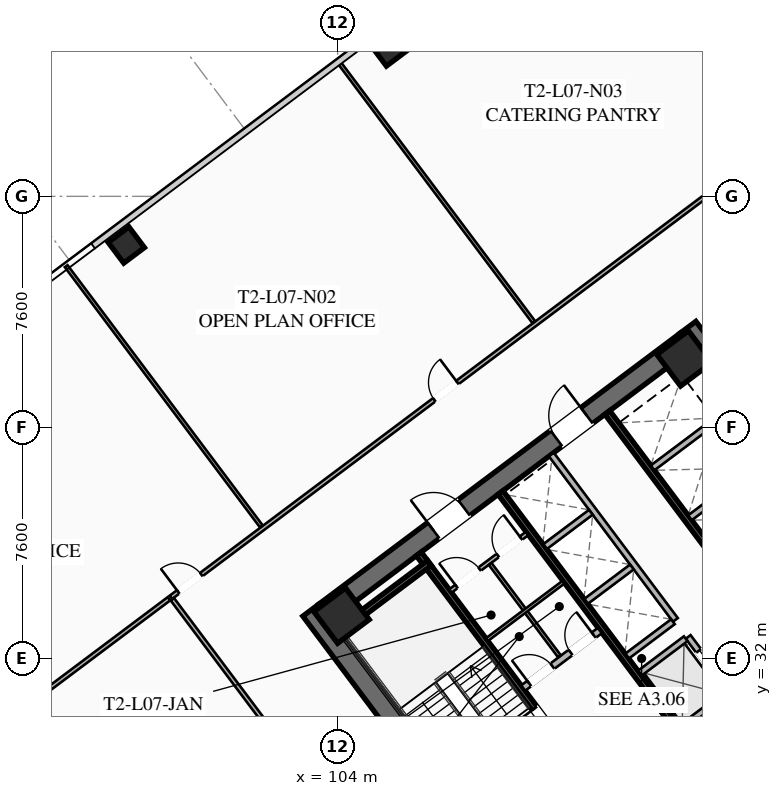
"""IFC4 building model, lengths in metres.
Left out: names, types, materials, properties, quantities, classifications, styles, units other than length and angle.
Written with IfcOpenShell. Run it as: python <this file> out.ifc"""

import sys

from ifc_helpers import new_model, si_unit, direction, frame, frame_2d, origin, origin_2d, place, context, subcontext, project, spatial, rectangle, hollow_rectangle, extrude, element, fill, save


model = new_model("IFC4")
c1 = context("Model", 3, precision=1e-05, world=origin(), true_north=direction((0.0, 1.0)))
c2 = subcontext(c1, "Body", "Model", "MODEL_VIEW")
j1 = project(units=[si_unit("LENGTHUNIT", "METRE"), si_unit("PLANEANGLEUNIT", "RADIAN")], contexts=[c1])
p1 = place(None, origin())
s1 = spatial("IfcSite", under=j1, at=p1, CompositionType="ELEMENT")
p2 = place(p1, origin())
s2 = spatial("IfcBuilding", under=s1, at=p2, CompositionType="ELEMENT")
p3 = place(p2, frame((0.0, 0.0, 31.7)))
s3 = spatial("IfcBuildingStorey", under=s2, at=p3, CompositionType="ELEMENT", Elevation=31.7)
for number, where, z_axis, x_axis in (
    (1, (112.476, 21.107, 0.0), (0.0, 0.0, 1.0), (-0.6, 0.8, 0.0)),
    (2, (115.524, 42.893, 0.0), (0.0, 0.0, 1.0), (0.6, -0.8, 0.0)),
):
    element("IfcWall", number, at=place(p3, frame(where, z_axis=z_axis, x_axis=x_axis)), inside=s3, PredefinedType="SHEAR", context=c2, shape_type="SweptSolid", body=[
        extrude(rectangle(XDim=15.6, YDim=0.65, at=frame_2d((7.8, 0.0))), origin(), (0.0, 0.0, 1.0), 3.55),
    ])
p4 = place(p3, frame((124.429, 30.478, 0.0), z_axis=(0.0, 0.0, 1.0), x_axis=(-0.799998028465, -0.600002628705, 0.0)))
e3 = element("IfcWall", 3, at=p4, inside=s3, PredefinedType="SHEAR", context=c2, shape_type="SweptSolid", body=[
    extrude(rectangle(XDim=14.86, YDim=0.65, at=frame_2d((7.43, 0.0))), origin(), (0.0, 0.0, 1.0), 3.55),
])
p5 = place(p4, frame((9.13, 0.0, 0.0)))
e4 = element("IfcOpeningElement", 4, at=p5, cuts=e3, PredefinedType="OPENING", context=c2, shape_type="SweptSolid", body=[
    extrude(rectangle(XDim=1.25, YDim=2.25, at=frame_2d((0.625, 1.125))), frame((0.0, 0.335, 0.0), z_axis=(0.0, -1.0, 0.0), x_axis=(1.0, 0.0, 0.0)), (0.0, 0.0, 1.0), 0.67),
])
p6 = place(p4, frame((4.08, 0.0, 0.0)))
e5 = element("IfcOpeningElement", 5, at=p6, cuts=e3, PredefinedType="OPENING", context=c2, shape_type="SweptSolid", body=[
    extrude(rectangle(XDim=1.25, YDim=2.25, at=frame_2d((0.625, 1.125))), frame((0.0, 0.335, 0.0), z_axis=(0.0, -1.0, 0.0), x_axis=(1.0, 0.0, 0.0)), (0.0, 0.0, 1.0), 0.67),
])
p7 = place(p3, frame((103.571, 33.522, 0.0), z_axis=(0.0, 0.0, 1.0), x_axis=(0.799998028465, 0.600002628705, 0.0)))
e6 = element("IfcWall", 6, at=p7, inside=s3, PredefinedType="SHEAR", context=c2, shape_type="SweptSolid", body=[
    extrude(rectangle(XDim=14.86, YDim=0.65, at=frame_2d((7.43, 0.0))), origin(), (0.0, 0.0, 1.0), 3.55),
])
p8 = place(p7, frame((4.48, 0.0, 0.0)))
e7 = element("IfcOpeningElement", 7, at=p8, cuts=e6, PredefinedType="OPENING", context=c2, shape_type="SweptSolid", body=[
    extrude(rectangle(XDim=1.25, YDim=2.25, at=frame_2d((0.625, 1.125))), frame((0.0, 0.335, 0.0), z_axis=(0.0, -1.0, 0.0), x_axis=(1.0, 0.0, 0.0)), (0.0, 0.0, 1.0), 0.67),
])
p9 = place(p7, frame((9.53, 0.0, 0.0)))
e8 = element("IfcOpeningElement", 8, at=p9, cuts=e6, PredefinedType="OPENING", context=c2, shape_type="SweptSolid", body=[
    extrude(rectangle(XDim=1.25, YDim=2.25, at=frame_2d((0.625, 1.125))), frame((0.0, 0.335, 0.0), z_axis=(0.0, -1.0, 0.0), x_axis=(1.0, 0.0, 0.0)), (0.0, 0.0, 1.0), 0.67),
])
for number, where, z_axis, x_axis in (
    (9, (115.41, 41.87, 0.0), (0.0, 0.0, 1.0), (0.8, 0.6, 0.0)),
    (10, (104.13, 33.41, 0.0), (0.0, 0.0, 1.0), (0.8, 0.6, 0.0)),
):
    element("IfcColumn", number, at=place(p3, frame(where, z_axis=z_axis, x_axis=x_axis)), inside=s3, PredefinedType="COLUMN", context=c2, shape_type="SweptSolid", body=[
        extrude(hollow_rectangle(XDim=1.3, YDim=1.3, WallThickness=0.05, at=origin_2d()), origin(), (0.0, 0.0, 1.0), 3.35),
    ])
for number, where, z_axis, x_axis in (
    (11, (105.69, 52.08, 0.0), (0.0, 0.0, 1.0), (0.8, 0.6, 0.0)),
    (12, (97.05, 45.6, 0.0), (0.0, 0.0, 1.0), (0.8, 0.6, 0.0)),
):
    element("IfcColumn", number, at=place(p3, frame(where, z_axis=z_axis, x_axis=x_axis)), inside=s3, PredefinedType="COLUMN", context=c2, shape_type="SweptSolid", body=[
        extrude(hollow_rectangle(XDim=0.85, YDim=0.85, WallThickness=0.035, at=origin_2d()), origin(), (0.0, 0.0, 1.0), 3.35),
    ])
p10 = place(p3, frame((111.44, 29.08, 0.0), z_axis=(0.0, 0.0, 1.0), x_axis=(-0.600009827119, 0.799992629566, 0.0)))
e13 = element("IfcWall", 13, at=p10, inside=s3, PredefinedType="SHEAR", context=c2, shape_type="SweptSolid", body=[
    extrude(rectangle(XDim=7.95, YDim=0.2, at=frame_2d((3.975, 0.0))), origin(), (0.0, 0.0, 1.0), 3.35),
])
p11 = place(p10, frame((0.45, 0.0, 0.0)))
e14 = element("IfcOpeningElement", 14, at=p11, cuts=e13, PredefinedType="OPENING", context=c2, shape_type="SweptSolid", body=[
    extrude(rectangle(XDim=1.15, YDim=2.2, at=frame_2d((0.575, 1.1))), frame((0.0, 0.11, 0.0), z_axis=(0.0, -1.0, 0.0), x_axis=(1.0, 0.0, 0.0)), (0.0, 0.0, 1.0), 0.22),
])
p12 = place(p3, frame((104.036, 32.902, 0.0), z_axis=(0.0, 0.0, 1.0), x_axis=(0.800039270442, 0.59994763584, 0.0)))
e15 = element("IfcWall", 15, at=p12, inside=s3, PredefinedType="SHEAR", context=c2, shape_type="SweptSolid", body=[
    extrude(rectangle(XDim=3.73, YDim=0.2, at=frame_2d((1.865, 0.0))), origin(), (0.0, 0.0, 1.0), 3.35),
])
p13 = place(p3, frame((117.938, 26.016, 0.0), z_axis=(0.0, 0.0, 1.0), x_axis=(-0.600005463273, 0.799995902516, 0.0)))
e16 = element("IfcWall", 16, at=p13, inside=s3, PredefinedType="SHEAR", context=c2, shape_type="SweptSolid", body=[
    extrude(rectangle(XDim=14.3, YDim=0.2, at=frame_2d((7.15, 0.0))), origin(), (0.0, 0.0, 1.0), 3.35),
])
p14 = place(p3, frame((110.104, 31.028, 0.0), z_axis=(0.0, 0.0, 1.0), x_axis=(0.800018601094, 0.59997519774, 0.0)))
e17 = element("IfcWall", 17, at=p14, inside=s3, PredefinedType="SOLIDWALL", context=c2, shape_type="SweptSolid", body=[
    extrude(rectangle(XDim=3.15, YDim=0.22, at=frame_2d((1.575, 0.0))), origin(), (0.0, 0.0, 1.0), 2.703),
])
p15 = place(p14, frame((0.25, 0.0, 0.0)))
e18 = element("IfcOpeningElement", 18, at=p15, cuts=e17, PredefinedType="OPENING", context=c2, shape_type="SweptSolid", body=[
    extrude(rectangle(XDim=0.95, YDim=2.05, at=frame_2d((0.475, 1.025))), frame((0.0, 0.12, 0.0), z_axis=(0.0, -1.0, 0.0), x_axis=(1.0, 0.0, 0.0)), (0.0, 0.0, 1.0), 0.24),
])
p16 = place(p14, frame((1.95, 0.0, 0.0)))
e19 = element("IfcOpeningElement", 19, at=p16, cuts=e17, PredefinedType="OPENING", context=c2, shape_type="SweptSolid", body=[
    extrude(rectangle(XDim=0.95, YDim=2.05, at=frame_2d((0.475, 1.025))), frame((0.0, 0.12, 0.0), z_axis=(0.0, -1.0, 0.0), x_axis=(1.0, 0.0, 0.0)), (0.0, 0.0, 1.0), 0.24),
])
p17 = place(p3, frame((112.87, 40.09, 0.0), z_axis=(0.0, 0.0, 1.0), x_axis=(0.599975393228, -0.800018454488, 0.0)))
e20 = element("IfcWall", 20, at=p17, inside=s3, PredefinedType="SHEAR", context=c2, shape_type="SweptSolid", body=[
    extrude(rectangle(XDim=6.35, YDim=0.2, at=frame_2d((3.175, 0.0))), origin(), (0.0, 0.0, 1.0), 3.35),
])
for number, where, z_axis, x_axis in (
    (21, (115.59, 36.63, 0.0), (0.0, 0.0, 1.0), (0.8, 0.6, 0.0)),
    (22, (114.36, 38.27, 0.0), (0.0, 0.0, 1.0), (0.8, 0.6, 0.0)),
):
    element("IfcWall", number, at=place(p3, frame(where, z_axis=z_axis, x_axis=x_axis)), inside=s3, PredefinedType="SOLIDWALL", context=c2, shape_type="SweptSolid", body=[
        extrude(rectangle(XDim=3.38, YDim=0.2, at=frame_2d((1.69, 0.0))), origin(), (0.0, 0.0, 1.0), 3.35),
    ])
p18 = place(p3, frame((107.71, 34.22, 0.0), z_axis=(0.0, 0.0, 1.0), x_axis=(0.799981399002, 0.60002480053, 0.0)))
e23 = element("IfcWall", 23, at=p18, inside=s3, PredefinedType="PARTITIONING", context=c2, shape_type="SweptSolid", body=[
    extrude(rectangle(XDim=3.15, YDim=0.135, at=frame_2d((1.575, 0.0))), origin(), (0.0, 0.0, 1.0), 2.703),
])
p19 = place(p18, frame((0.25, 0.0, 0.0)))
e24 = element("IfcOpeningElement", 24, at=p19, cuts=e23, PredefinedType="OPENING", context=c2, shape_type="SweptSolid", body=[
    extrude(rectangle(XDim=0.95, YDim=2.05, at=frame_2d((0.475, 1.025))), frame((0.0, 0.077, 0.0), z_axis=(0.0, -1.0, 0.0), x_axis=(1.0, 0.0, 0.0)), (0.0, 0.0, 1.0), 0.155),
])
p20 = place(p18, frame((1.95, 0.0, 0.0)))
e25 = element("IfcOpeningElement", 25, at=p20, cuts=e23, PredefinedType="OPENING", context=c2, shape_type="SweptSolid", body=[
    extrude(rectangle(XDim=0.95, YDim=2.05, at=frame_2d((0.475, 1.025))), frame((0.0, 0.077, 0.0), z_axis=(0.0, -1.0, 0.0), x_axis=(1.0, 0.0, 0.0)), (0.0, 0.0, 1.0), 0.155),
])
p21 = place(p3, frame((111.296, 32.072, 0.0), z_axis=(0.0, 0.0, 1.0), x_axis=(-0.59995887973, 0.800030838552, 0.0)))
e26 = element("IfcWall", 26, at=p21, inside=s3, PredefinedType="PARTITIONING", context=c2, shape_type="SweptSolid", body=[
    extrude(rectangle(XDim=3.8, YDim=0.11, at=frame_2d((1.9, 0.0))), origin(), (0.0, 0.0, 1.0), 2.703),
])
p22 = place(p3, frame((108.91, 32.62, 0.0), z_axis=(0.0, 0.0, 1.0), x_axis=(0.800018601094, 0.59997519774, 0.0)))
e27 = element("IfcWall", 27, at=p22, inside=s3, PredefinedType="PARTITIONING", context=c2, shape_type="SweptSolid", body=[
    extrude(rectangle(XDim=3.15, YDim=0.11, at=frame_2d((1.575, 0.0))), origin(), (0.0, 0.0, 1.0), 2.703),
])
p23 = place(p3, frame((119.61, 27.27, 0.0), z_axis=(0.0, 0.0, 1.0), x_axis=(-0.600011488909, 0.79999138319, 0.0)))
e28 = element("IfcWall", 28, at=p23, inside=s3, PredefinedType="SOLIDWALL", context=c2, shape_type="SweptSolid", body=[
    extrude(rectangle(XDim=6.8, YDim=0.2, at=frame_2d((3.4, 0.0))), origin(), (0.0, 0.0, 1.0), 3.35),
])
p24 = place(p23, frame((0.625, 0.0, 0.0)))
e29 = element("IfcOpeningElement", 29, at=p24, cuts=e28, PredefinedType="OPENING", context=c2, shape_type="SweptSolid", body=[
    extrude(rectangle(XDim=1.1, YDim=2.2, at=frame_2d((0.55, 1.1))), frame((0.0, 0.11, 0.0), z_axis=(0.0, -1.0, 0.0), x_axis=(1.0, 0.0, 0.0)), (0.0, 0.0, 1.0), 0.22),
])
p25 = place(p23, frame((2.875, 0.0, 0.0)))
e30 = element("IfcOpeningElement", 30, at=p25, cuts=e28, PredefinedType="OPENING", context=c2, shape_type="SweptSolid", body=[
    extrude(rectangle(XDim=1.1, YDim=2.2, at=frame_2d((0.55, 1.1))), frame((0.0, 0.11, 0.0), z_axis=(0.0, -1.0, 0.0), x_axis=(1.0, 0.0, 0.0)), (0.0, 0.0, 1.0), 0.22),
])
p26 = place(p23, frame((5.125, 0.0, 0.0)))
e31 = element("IfcOpeningElement", 31, at=p26, cuts=e28, PredefinedType="OPENING", context=c2, shape_type="SweptSolid", body=[
    extrude(rectangle(XDim=1.1, YDim=2.2, at=frame_2d((0.55, 1.1))), frame((0.0, 0.11, 0.0), z_axis=(0.0, -1.0, 0.0), x_axis=(1.0, 0.0, 0.0)), (0.0, 0.0, 1.0), 0.22),
])
p27 = place(p3, frame((115.296, 29.722, 0.0), z_axis=(0.0, 0.0, 1.0), x_axis=(0.799984418148, 0.600020775241, 0.0)))
e32 = element("IfcWall", 32, at=p27, inside=s3, PredefinedType="SOLIDWALL", context=c2, shape_type="SweptSolid", body=[
    extrude(rectangle(XDim=1.88, YDim=0.2, at=frame_2d((0.94, 0.0))), origin(), (0.0, 0.0, 1.0), 3.35),
])
p28 = place(p3, frame((113.946, 31.522, 0.0), z_axis=(0.0, 0.0, 1.0), x_axis=(0.8, 0.6, 0.0)))
e33 = element("IfcWall", 33, at=p28, inside=s3, PredefinedType="SOLIDWALL", context=c2, shape_type="SweptSolid", body=[
    extrude(rectangle(XDim=1.88, YDim=0.2, at=frame_2d((0.94, 0.0))), origin(), (0.0, 0.0, 1.0), 3.35),
])
p29 = place(p3, frame((115.11, 33.27, 0.0), z_axis=(0.0, 0.0, 1.0), x_axis=(-0.600011488909, 0.79999138319, 0.0)))
e34 = element("IfcWall", 34, at=p29, inside=s3, PredefinedType="SOLIDWALL", context=c2, shape_type="SweptSolid", body=[
    extrude(rectangle(XDim=6.8, YDim=0.2, at=frame_2d((3.4, 0.0))), origin(), (0.0, 0.0, 1.0), 3.35),
])
p30 = place(p3, frame((113.526, 32.082, 0.0), z_axis=(0.0, 0.0, 1.0), x_axis=(0.800046745961, 0.599937666993, 0.0)))
e35 = element("IfcWall", 35, at=p30, inside=s3, PredefinedType="SOLIDWALL", context=c2, shape_type="SweptSolid", body=[
    extrude(rectangle(XDim=1.88, YDim=0.2, at=frame_2d((0.94, 0.0))), origin(), (0.0, 0.0, 1.0), 3.35),
])
p31 = place(p3, frame((112.176, 33.882, 0.0), z_axis=(0.0, 0.0, 1.0), x_axis=(0.8, 0.6, 0.0)))
e36 = element("IfcWall", 36, at=p31, inside=s3, PredefinedType="SOLIDWALL", context=c2, shape_type="SweptSolid", body=[
    extrude(rectangle(XDim=1.88, YDim=0.2, at=frame_2d((0.94, 0.0))), origin(), (0.0, 0.0, 1.0), 3.35),
])
p32 = place(p3, frame((110.826, 35.682, 0.0), z_axis=(0.0, 0.0, 1.0), x_axis=(0.799984418148, 0.600020775241, 0.0)))
e37 = element("IfcWall", 37, at=p32, inside=s3, PredefinedType="SOLIDWALL", context=c2, shape_type="SweptSolid", body=[
    extrude(rectangle(XDim=1.88, YDim=0.2, at=frame_2d((0.94, 0.0))), origin(), (0.0, 0.0, 1.0), 3.35),
])
p33 = place(p3, frame((98.516, 34.012, 0.0), z_axis=(0.0, 0.0, 1.0), x_axis=(0.799998035726, 0.600002619023, 0.0)))
e38 = element("IfcWall", 38, at=p33, inside=s3, PredefinedType="PARTITIONING", context=c2, shape_type="SweptSolid", body=[
    extrude(rectangle(XDim=29.83, YDim=0.135, at=frame_2d((14.915, 0.0))), origin(), (0.0, 0.0, 1.0), 2.703),
])
p34 = place(p33, frame((0.3, 0.0, 0.0)))
e39 = element("IfcOpeningElement", 39, at=p34, cuts=e38, PredefinedType="OPENING", context=c2, shape_type="SweptSolid", body=[
    extrude(rectangle(XDim=0.95, YDim=2.05, at=frame_2d((0.475, 1.025))), frame((0.0, 0.077, 0.0), z_axis=(0.0, -1.0, 0.0), x_axis=(1.0, 0.0, 0.0)), (0.0, 0.0, 1.0), 0.155),
])
p35 = place(p33, frame((10.829, 0.0, 0.0)))
e40 = element("IfcOpeningElement", 40, at=p35, cuts=e38, PredefinedType="OPENING", context=c2, shape_type="SweptSolid", body=[
    extrude(rectangle(XDim=0.95, YDim=2.05, at=frame_2d((0.475, 1.025))), frame((0.0, 0.077, 0.0), z_axis=(0.0, -1.0, 0.0), x_axis=(1.0, 0.0, 0.0)), (0.0, 0.0, 1.0), 0.155),
])
p36 = place(p33, frame((28.58, 0.0, 0.0)))
e41 = element("IfcOpeningElement", 41, at=p36, cuts=e38, PredefinedType="OPENING", context=c2, shape_type="SweptSolid", body=[
    extrude(rectangle(XDim=0.95, YDim=2.05, at=frame_2d((0.475, 1.025))), frame((0.0, 0.077, 0.0), z_axis=(0.0, -1.0, 0.0), x_axis=(1.0, 0.0, 0.0)), (0.0, 0.0, 1.0), 0.155),
])
for number, where, z_axis, x_axis in (
    (42, (101.492, 36.344, 0.0), (0.0, 0.0, 1.0), (-0.6, 0.8, 0.0)),
    (43, (110.452, 43.064, 0.0), (0.0, 0.0, 1.0), (-0.6, 0.8, 0.0)),
):
    element("IfcWall", number, at=place(p3, frame(where, z_axis=z_axis, x_axis=x_axis)), inside=s3, PredefinedType="PARTITIONING", context=c2, shape_type="SweptSolid", body=[
        extrude(rectangle(XDim=10.7, YDim=0.11, at=frame_2d((5.35, 0.0))), origin(), (0.0, 0.0, 1.0), 2.703),
    ])
p37 = place(p3, frame((135.46, 34.47, 0.0), z_axis=(0.0, 0.0, 1.0), x_axis=(-0.800000982127, -0.599998690494, 0.0)))
e44 = element("IfcWall", 44, at=p37, inside=s3, PredefinedType="PARTITIONING", context=c2, shape_type="SweptSolid", body=[
    extrude(rectangle(XDim=29.83, YDim=0.135, at=frame_2d((14.915, 0.0))), origin(), (0.0, 0.0, 1.0), 2.703),
])
p38 = place(p37, frame((28.5, 0.0, 0.0)))
e45 = element("IfcOpeningElement", 45, at=p38, cuts=e44, PredefinedType="OPENING", context=c2, shape_type="SweptSolid", body=[
    extrude(rectangle(XDim=0.95, YDim=2.05, at=frame_2d((0.475, 1.025))), frame((0.0, 0.077, 0.0), z_axis=(0.0, -1.0, 0.0), x_axis=(1.0, 0.0, 0.0)), (0.0, 0.0, 1.0), 0.155),
])
p39 = place(p37, frame((18.075, 0.0, 0.0)))
e46 = element("IfcOpeningElement", 46, at=p39, cuts=e44, PredefinedType="OPENING", context=c2, shape_type="SweptSolid", body=[
    extrude(rectangle(XDim=0.95, YDim=2.05, at=frame_2d((0.475, 1.025))), frame((0.0, 0.077, 0.0), z_axis=(0.0, -1.0, 0.0), x_axis=(1.0, 0.0, 0.0)), (0.0, 0.0, 1.0), 0.155),
])
p40 = place(p37, frame((0.38, 0.0, 0.0)))
e47 = element("IfcOpeningElement", 47, at=p40, cuts=e44, PredefinedType="OPENING", context=c2, shape_type="SweptSolid", body=[
    extrude(rectangle(XDim=0.95, YDim=2.05, at=frame_2d((0.475, 1.025))), frame((0.0, 0.077, 0.0), z_axis=(0.0, -1.0, 0.0), x_axis=(1.0, 0.0, 0.0)), (0.0, 0.0, 1.0), 0.155),
])
p41 = place(p3, frame((111.548, 16.636, 0.0), z_axis=(0.0, 0.0, 1.0), x_axis=(-0.600003610192, 0.799997292343, 0.0)))
e48 = element("IfcWall", 48, at=p41, inside=s3, PredefinedType="PARTITIONING", context=c2, shape_type="SweptSolid", body=[
    extrude(rectangle(XDim=21.64, YDim=0.135, at=frame_2d((10.82, 0.0))), origin(), (0.0, 0.0, 1.0), 2.703),
])
p42 = place(p41, frame((0.3, 0.0, 0.0)))
e49 = element("IfcOpeningElement", 49, at=p42, cuts=e48, PredefinedType="OPENING", context=c2, shape_type="SweptSolid", body=[
    extrude(rectangle(XDim=0.95, YDim=2.05, at=frame_2d((0.475, 1.025))), frame((0.0, 0.077, 0.0), z_axis=(0.0, -1.0, 0.0), x_axis=(1.0, 0.0, 0.0)), (0.0, 0.0, 1.0), 0.155),
])
p43 = place(p3, frame((98.452, 33.964, 0.0), z_axis=(0.0, 0.0, 1.0), x_axis=(-0.799988753532, -0.600014994998, 0.0)))
e50 = element("IfcWall", 50, at=p43, inside=s3, PredefinedType="PARTITIONING", context=c2, shape_type="SweptSolid", body=[
    extrude(rectangle(XDim=10.42, YDim=0.135, at=frame_2d((5.21, 0.0))), origin(), (0.0, 0.0, 1.0), 2.703),
])
p44 = place(p8, origin())
e51 = element("IfcDoor", 51, at=p44, inside=s3, OperationType="SINGLE_SWING_LEFT", PredefinedType="DOOR", context=c2, shape_type="SweptSolid", body=[
    extrude(rectangle(XDim=1.25, YDim=2.25, at=frame_2d((0.625, 1.125))), frame((0.0, 0.025, 0.0), z_axis=(0.0, -1.0, 0.0), x_axis=(1.0, 0.0, 0.0)), (0.0, 0.0, 1.0), 0.05),
])
fill(e7, e51)
p45 = place(p9, origin())
e52 = element("IfcDoor", 52, at=p45, inside=s3, OperationType="SINGLE_SWING_RIGHT", PredefinedType="DOOR", context=c2, shape_type="SweptSolid", body=[
    extrude(rectangle(XDim=1.25, YDim=2.25, at=frame_2d((0.625, 1.125))), frame((0.0, 0.025, 0.0), z_axis=(0.0, -1.0, 0.0), x_axis=(1.0, 0.0, 0.0)), (0.0, 0.0, 1.0), 0.05),
])
fill(e8, e52)
p46 = place(p11, origin())
e53 = element("IfcDoor", 53, at=p46, inside=s3, OperationType="SINGLE_SWING_RIGHT", PredefinedType="DOOR", context=c2, shape_type="SweptSolid", body=[
    extrude(rectangle(XDim=1.15, YDim=2.2, at=frame_2d((0.575, 1.1))), frame((0.0, 0.025, 0.0), z_axis=(0.0, -1.0, 0.0), x_axis=(1.0, 0.0, 0.0)), (0.0, 0.0, 1.0), 0.05),
])
fill(e14, e53)
p47 = place(p19, origin())
e54 = element("IfcDoor", 54, at=p47, inside=s3, OperationType="SINGLE_SWING_LEFT", PredefinedType="DOOR", context=c2, shape_type="SweptSolid", body=[
    extrude(rectangle(XDim=0.95, YDim=2.05, at=frame_2d((0.475, 1.025))), frame((0.0, 0.025, 0.0), z_axis=(0.0, -1.0, 0.0), x_axis=(1.0, 0.0, 0.0)), (0.0, 0.0, 1.0), 0.05),
])
fill(e24, e54)
p48 = place(p20, origin())
e55 = element("IfcDoor", 55, at=p48, inside=s3, OperationType="SINGLE_SWING_RIGHT", PredefinedType="DOOR", context=c2, shape_type="SweptSolid", body=[
    extrude(rectangle(XDim=0.95, YDim=2.05, at=frame_2d((0.475, 1.025))), frame((0.0, 0.025, 0.0), z_axis=(0.0, -1.0, 0.0), x_axis=(1.0, 0.0, 0.0)), (0.0, 0.0, 1.0), 0.05),
])
fill(e25, e55)
p49 = place(p15, origin())
e56 = element("IfcDoor", 56, at=p49, inside=s3, OperationType="SINGLE_SWING_LEFT", PredefinedType="DOOR", context=c2, shape_type="SweptSolid", body=[
    extrude(rectangle(XDim=0.95, YDim=2.05, at=frame_2d((0.475, 1.025))), frame((0.0, 0.025, 0.0), z_axis=(0.0, -1.0, 0.0), x_axis=(1.0, 0.0, 0.0)), (0.0, 0.0, 1.0), 0.05),
])
fill(e18, e56)
p50 = place(p16, origin())
e57 = element("IfcDoor", 57, at=p50, inside=s3, OperationType="SINGLE_SWING_RIGHT", PredefinedType="DOOR", context=c2, shape_type="SweptSolid", body=[
    extrude(rectangle(XDim=0.95, YDim=2.05, at=frame_2d((0.475, 1.025))), frame((0.0, 0.025, 0.0), z_axis=(0.0, -1.0, 0.0), x_axis=(1.0, 0.0, 0.0)), (0.0, 0.0, 1.0), 0.05),
])
fill(e19, e57)
p51 = place(p34, origin())
e58 = element("IfcDoor", 58, at=p51, inside=s3, OperationType="SINGLE_SWING_LEFT", PredefinedType="DOOR", context=c2, shape_type="SweptSolid", body=[
    extrude(rectangle(XDim=0.95, YDim=2.05, at=frame_2d((0.475, 1.025))), frame((0.0, 0.025, 0.0), z_axis=(0.0, -1.0, 0.0), x_axis=(1.0, 0.0, 0.0)), (0.0, 0.0, 1.0), 0.05),
])
fill(e39, e58)
p52 = place(p35, origin())
e59 = element("IfcDoor", 59, at=p52, inside=s3, OperationType="SINGLE_SWING_RIGHT", PredefinedType="DOOR", context=c2, shape_type="SweptSolid", body=[
    extrude(rectangle(XDim=0.95, YDim=2.05, at=frame_2d((0.475, 1.025))), frame((0.0, 0.025, 0.0), z_axis=(0.0, -1.0, 0.0), x_axis=(1.0, 0.0, 0.0)), (0.0, 0.0, 1.0), 0.05),
])
fill(e40, e59)
p53 = place(p26, origin())
e60 = element("IfcDoor", 60, at=p53, inside=s3, OperationType="SLIDING_TO_LEFT", PredefinedType="DOOR", context=c2, shape_type="SweptSolid", body=[
    extrude(rectangle(XDim=1.1, YDim=2.2, at=frame_2d((0.55, 1.1))), frame((0.0, 0.025, 0.0), z_axis=(0.0, -1.0, 0.0), x_axis=(1.0, 0.0, 0.0)), (0.0, 0.0, 1.0), 0.05),
])
fill(e31, e60)
save(model, sys.argv[1])
